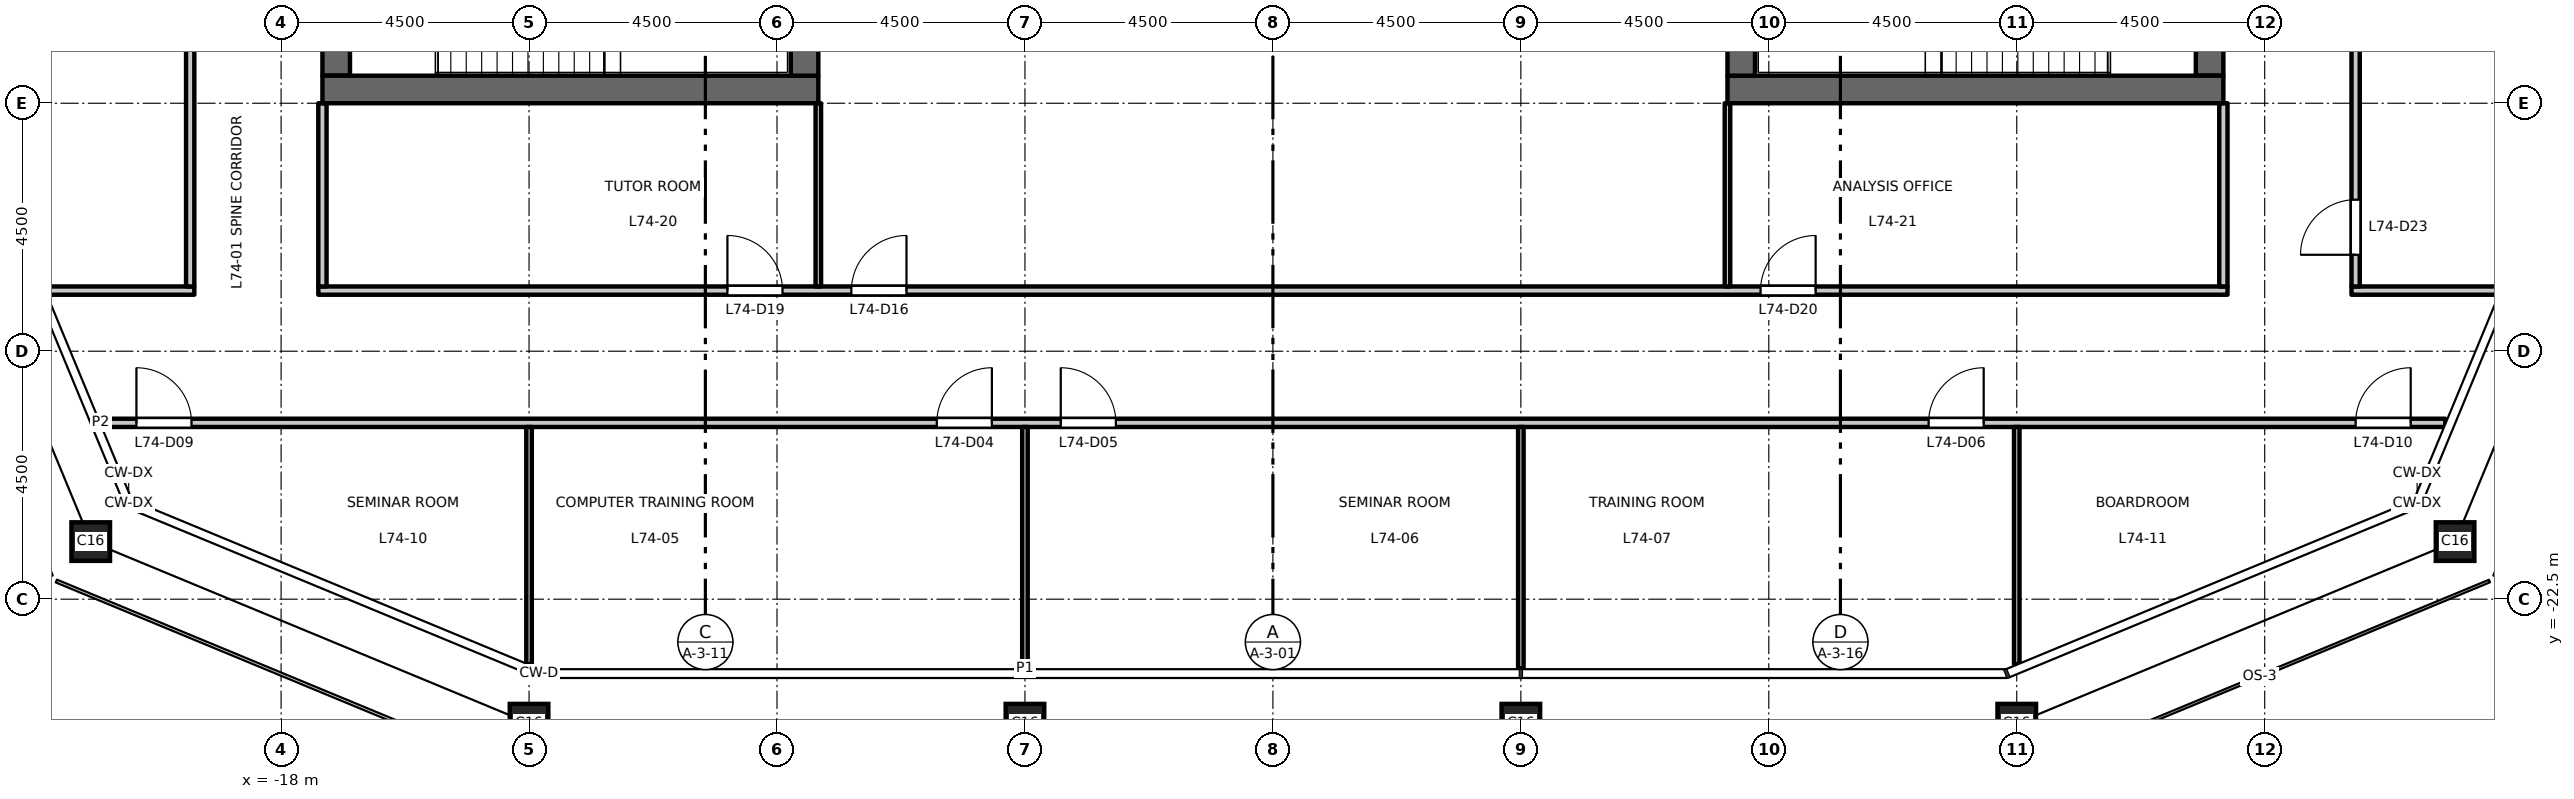
"""IFC4 building model, lengths in metres.
Left out: names, types, materials, properties, quantities, classifications, styles, units other than length and angle.
Written with IfcOpenShell. Run it as: python <this file> out.ifc"""

import sys

from ifc_helpers import new_model, si_unit, direction, frame, frame_2d, origin, origin_2d, place, context, subcontext, project, spatial, rectangle, hollow_rectangle, extrude, element, fill, save


model = new_model("IFC4")
c1 = context("Model", 3, precision=1e-05, world=origin(), true_north=direction((0.0, 1.0)))
c2 = subcontext(c1, "Body", "Model", "MODEL_VIEW")
j1 = project(units=[si_unit("LENGTHUNIT", "METRE"), si_unit("PLANEANGLEUNIT", "RADIAN")], contexts=[c1])
p1 = place(None, origin())
s1 = spatial("IfcSite", under=j1, at=p1, CompositionType="ELEMENT")
p2 = place(p1, origin())
s2 = spatial("IfcBuilding", under=s1, at=p2, CompositionType="ELEMENT")
p3 = place(p2, frame((0.0, 0.0, 343.7)))
s3 = spatial("IfcBuildingStorey", under=s2, at=p3, CompositionType="ELEMENT", Elevation=343.7)
for number, where, z_axis, x_axis in (
    (1, (-13.5, -24.75, 0.0), (0.0, 0.0, 1.0), (1.0, 0.0, 0.0)),
    (2, (-4.5, -24.75, 0.0), (0.0, 0.0, 1.0), (1.0, 0.0, 0.0)),
    (3, (4.5, -24.75, 0.0), (0.0, 0.0, 1.0), (1.0, 0.0, 0.0)),
    (4, (13.5, -24.75, 0.0), (0.0, 0.0, 1.0), (1.0, 0.0, 0.0)),
    (5, (21.455, -21.455, 0.0), (0.0, 0.0, 1.0), (1.0, 0.0, 0.0)),
    (6, (-21.455, -21.455, 0.0), (0.0, 0.0, 1.0), (1.0, 0.0, 0.0)),
):
    element("IfcColumn", number, at=place(p3, frame(where, z_axis=z_axis, x_axis=x_axis)), inside=s3, PredefinedType="COLUMN", context=c2, shape_type="SweptSolid", body=[
        extrude(hollow_rectangle(XDim=0.7, YDim=0.7, WallThickness=0.036, at=origin_2d()), origin(), (0.0, 0.0, 1.0), 4.5),
    ])
p4 = place(p3, frame((-17.0, -13.0, 0.0), z_axis=(0.0, 0.0, 1.0), x_axis=(0.0, 1.0, 0.0)))
e7 = element("IfcWall", 7, at=p4, inside=s3, PredefinedType="SHEAR", context=c2, shape_type="SweptSolid", body=[
    extrude(rectangle(XDim=26.0, YDim=0.5, at=frame_2d((13.0, 0.0))), origin(), (0.0, 0.0, 1.0), 4.3),
])
p5 = place(p4, frame((16.825, 0.0, 0.0)))
e8 = element("IfcOpeningElement", 8, at=p5, cuts=e7, PredefinedType="OPENING", context=c2, shape_type="SweptSolid", body=[
    extrude(rectangle(XDim=1.8, YDim=2.1, at=frame_2d((0.9, 1.05))), frame((0.0, 0.26, 0.0), z_axis=(0.0, -1.0, 0.0), x_axis=(1.0, 0.0, 0.0)), (0.0, 0.0, 1.0), 0.52),
])
p6 = place(p4, frame((7.375, 0.0, 0.0)))
e9 = element("IfcOpeningElement", 9, at=p6, cuts=e7, PredefinedType="OPENING", context=c2, shape_type="SweptSolid", body=[
    extrude(rectangle(XDim=1.8, YDim=2.1, at=frame_2d((0.9, 1.05))), frame((0.0, 0.26, 0.0), z_axis=(0.0, -1.0, 0.0), x_axis=(1.0, 0.0, 0.0)), (0.0, 0.0, 1.0), 0.52),
])
p7 = place(p3, frame((-8.25, -13.25, 0.0), z_axis=(0.0, 0.0, 1.0), x_axis=(-1.0, 0.0, 0.0)))
e10 = element("IfcWall", 10, at=p7, inside=s3, PredefinedType="SHEAR", context=c2, shape_type="SweptSolid", body=[
    extrude(rectangle(XDim=9.0, YDim=0.5, at=frame_2d((4.5, 0.0))), origin(), (0.0, 0.0, 1.0), 4.3),
])
p8 = place(p3, frame((-8.5, -13.0, 0.0), z_axis=(0.0, 0.0, 1.0), x_axis=(0.0, 1.0, 0.0)))
e11 = element("IfcWall", 11, at=p8, inside=s3, PredefinedType="SHEAR", context=c2, shape_type="SweptSolid", body=[
    extrude(rectangle(XDim=26.0, YDim=0.5, at=frame_2d((13.0, 0.0))), origin(), (0.0, 0.0, 1.0), 4.3),
])
p9 = place(p3, frame((17.0, -13.0, 0.0), z_axis=(0.0, 0.0, 1.0), x_axis=(0.0, 1.0, 0.0)))
e12 = element("IfcWall", 12, at=p9, inside=s3, PredefinedType="SHEAR", context=c2, shape_type="SweptSolid", body=[
    extrude(rectangle(XDim=26.0, YDim=0.5, at=frame_2d((13.0, 0.0))), origin(), (0.0, 0.0, 1.0), 4.3),
])
p10 = place(p9, frame((16.825, 0.0, 0.0)))
e13 = element("IfcOpeningElement", 13, at=p10, cuts=e12, PredefinedType="OPENING", context=c2, shape_type="SweptSolid", body=[
    extrude(rectangle(XDim=1.8, YDim=2.1, at=frame_2d((0.9, 1.05))), frame((0.0, 0.26, 0.0), z_axis=(0.0, -1.0, 0.0), x_axis=(1.0, 0.0, 0.0)), (0.0, 0.0, 1.0), 0.52),
])
p11 = place(p9, frame((7.375, 0.0, 0.0)))
e14 = element("IfcOpeningElement", 14, at=p11, cuts=e12, PredefinedType="OPENING", context=c2, shape_type="SweptSolid", body=[
    extrude(rectangle(XDim=1.8, YDim=2.1, at=frame_2d((0.9, 1.05))), frame((0.0, 0.26, 0.0), z_axis=(0.0, -1.0, 0.0), x_axis=(1.0, 0.0, 0.0)), (0.0, 0.0, 1.0), 0.52),
])
p12 = place(p3, frame((8.25, -13.25, 0.0), z_axis=(0.0, 0.0, 1.0), x_axis=(1.0, 0.0, 0.0)))
e15 = element("IfcWall", 15, at=p12, inside=s3, PredefinedType="SHEAR", context=c2, shape_type="SweptSolid", body=[
    extrude(rectangle(XDim=9.0, YDim=0.5, at=frame_2d((4.5, 0.0))), origin(), (0.0, 0.0, 1.0), 4.3),
])
p13 = place(p3, frame((8.5, -13.0, 0.0), z_axis=(0.0, 0.0, 1.0), x_axis=(0.0, 1.0, 0.0)))
e16 = element("IfcWall", 16, at=p13, inside=s3, PredefinedType="SHEAR", context=c2, shape_type="SweptSolid", body=[
    extrude(rectangle(XDim=26.0, YDim=0.5, at=frame_2d((13.0, 0.0))), origin(), (0.0, 0.0, 1.0), 4.3),
])
p14 = place(p3, frame((-21.276, -19.3, 0.0), z_axis=(0.0, 0.0, 1.0), x_axis=(1.0, 0.0, 0.0)))
e17 = element("IfcWall", 17, at=p14, inside=s3, PredefinedType="PARTITIONING", context=c2, shape_type="SweptSolid", body=[
    extrude(rectangle(XDim=42.552, YDim=0.15, at=frame_2d((21.276, 0.0))), origin(), (0.0, 0.0, 1.0), 4.3),
])
p15 = place(p14, frame((15.176, 0.0, 0.0)))
e18 = element("IfcOpeningElement", 18, at=p15, cuts=e17, PredefinedType="OPENING", context=c2, shape_type="SweptSolid", body=[
    extrude(rectangle(XDim=1.0, YDim=2.1, at=frame_2d((0.5, 1.05))), frame((0.0, 0.085, 0.0), z_axis=(0.0, -1.0, 0.0), x_axis=(1.0, 0.0, 0.0)), (0.0, 0.0, 1.0), 0.17),
])
p16 = place(p14, frame((17.426, 0.0, 0.0)))
e19 = element("IfcOpeningElement", 19, at=p16, cuts=e17, PredefinedType="OPENING", context=c2, shape_type="SweptSolid", body=[
    extrude(rectangle(XDim=1.0, YDim=2.1, at=frame_2d((0.5, 1.05))), frame((0.0, 0.085, 0.0), z_axis=(0.0, -1.0, 0.0), x_axis=(1.0, 0.0, 0.0)), (0.0, 0.0, 1.0), 0.17),
])
p17 = place(p14, frame((33.176, 0.0, 0.0)))
e20 = element("IfcOpeningElement", 20, at=p17, cuts=e17, PredefinedType="OPENING", context=c2, shape_type="SweptSolid", body=[
    extrude(rectangle(XDim=1.0, YDim=2.1, at=frame_2d((0.5, 1.05))), frame((0.0, 0.085, 0.0), z_axis=(0.0, -1.0, 0.0), x_axis=(1.0, 0.0, 0.0)), (0.0, 0.0, 1.0), 0.17),
])
p18 = place(p14, frame((0.65, 0.0, 0.0)))
e21 = element("IfcOpeningElement", 21, at=p18, cuts=e17, PredefinedType="OPENING", context=c2, shape_type="SweptSolid", body=[
    extrude(rectangle(XDim=1.0, YDim=2.1, at=frame_2d((0.5, 1.05))), frame((0.0, 0.085, 0.0), z_axis=(0.0, -1.0, 0.0), x_axis=(1.0, 0.0, 0.0)), (0.0, 0.0, 1.0), 0.17),
])
p19 = place(p14, frame((40.926, 0.0, 0.0)))
e22 = element("IfcOpeningElement", 22, at=p19, cuts=e17, PredefinedType="OPENING", context=c2, shape_type="SweptSolid", body=[
    extrude(rectangle(XDim=1.0, YDim=2.1, at=frame_2d((0.5, 1.05))), frame((0.0, 0.085, 0.0), z_axis=(0.0, -1.0, 0.0), x_axis=(1.0, 0.0, 0.0)), (0.0, 0.0, 1.0), 0.17),
])
p20 = place(p3, frame((-22.27, -16.9, 0.0), z_axis=(0.0, 0.0, 1.0), x_axis=(1.0, 0.0, 0.0)))
e23 = element("IfcWall", 23, at=p20, inside=s3, PredefinedType="PARTITIONING", context=c2, shape_type="SweptSolid", body=[
    extrude(rectangle(XDim=2.695, YDim=0.15, at=frame_2d((1.348, 0.0))), origin(), (0.0, 0.0, 1.0), 4.3),
])
p21 = place(p3, frame((-17.325, -16.9, 0.0), z_axis=(0.0, 0.0, 1.0), x_axis=(1.0, 0.0, 0.0)))
e24 = element("IfcWall", 24, at=p21, inside=s3, PredefinedType="PARTITIONING", context=c2, shape_type="SweptSolid", body=[
    extrude(rectangle(XDim=34.65, YDim=0.15, at=frame_2d((17.325, 0.0))), origin(), (0.0, 0.0, 1.0), 4.3),
])
p22 = place(p21, frame((9.675, 0.0, 0.0)))
e25 = element("IfcOpeningElement", 25, at=p22, cuts=e24, PredefinedType="OPENING", context=c2, shape_type="SweptSolid", body=[
    extrude(rectangle(XDim=1.0, YDim=2.1, at=frame_2d((0.5, 1.05))), frame((0.0, 0.085, 0.0), z_axis=(0.0, -1.0, 0.0), x_axis=(1.0, 0.0, 0.0)), (0.0, 0.0, 1.0), 0.17),
])
p23 = place(p21, frame((7.425, 0.0, 0.0)))
e26 = element("IfcOpeningElement", 26, at=p23, cuts=e24, PredefinedType="OPENING", context=c2, shape_type="SweptSolid", body=[
    extrude(rectangle(XDim=1.0, YDim=2.1, at=frame_2d((0.5, 1.05))), frame((0.0, 0.085, 0.0), z_axis=(0.0, -1.0, 0.0), x_axis=(1.0, 0.0, 0.0)), (0.0, 0.0, 1.0), 0.17),
])
p24 = place(p21, frame((26.175, 0.0, 0.0)))
e27 = element("IfcOpeningElement", 27, at=p24, cuts=e24, PredefinedType="OPENING", context=c2, shape_type="SweptSolid", body=[
    extrude(rectangle(XDim=1.0, YDim=2.1, at=frame_2d((0.5, 1.05))), frame((0.0, 0.085, 0.0), z_axis=(0.0, -1.0, 0.0), x_axis=(1.0, 0.0, 0.0)), (0.0, 0.0, 1.0), 0.17),
])
p25 = place(p3, frame((19.575, -16.9, 0.0), z_axis=(0.0, 0.0, 1.0), x_axis=(1.0, 0.0, 0.0)))
e28 = element("IfcWall", 28, at=p25, inside=s3, PredefinedType="PARTITIONING", context=c2, shape_type="SweptSolid", body=[
    extrude(rectangle(XDim=2.695, YDim=0.15, at=frame_2d((1.348, 0.0))), origin(), (0.0, 0.0, 1.0), 4.3),
])
p26 = place(p3, frame((-19.65, -16.825, 0.0), z_axis=(0.0, 0.0, 1.0), x_axis=(0.0, 1.0, 0.0)))
e29 = element("IfcWall", 29, at=p26, inside=s3, PredefinedType="PARTITIONING", context=c2, shape_type="SweptSolid", body=[
    extrude(rectangle(XDim=33.65, YDim=0.15, at=frame_2d((16.825, 0.0))), origin(), (0.0, 0.0, 1.0), 4.3),
])
p27 = place(p26, frame((32.075, 0.0, 0.0)))
e30 = element("IfcOpeningElement", 30, at=p27, cuts=e29, PredefinedType="OPENING", context=c2, shape_type="SweptSolid", body=[
    extrude(rectangle(XDim=1.0, YDim=2.1, at=frame_2d((0.5, 1.05))), frame((0.0, 0.085, 0.0), z_axis=(0.0, -1.0, 0.0), x_axis=(1.0, 0.0, 0.0)), (0.0, 0.0, 1.0), 0.17),
])
p28 = place(p3, frame((-17.25, -16.825, 0.0), z_axis=(0.0, 0.0, 1.0), x_axis=(0.0, 1.0, 0.0)))
e31 = element("IfcWall", 31, at=p28, inside=s3, PredefinedType="PARTITIONING", context=c2, shape_type="SweptSolid", body=[
    extrude(rectangle(XDim=3.325, YDim=0.15, at=frame_2d((1.663, 0.0))), origin(), (0.0, 0.0, 1.0), 4.3),
])
p29 = place(p3, frame((-13.5, -23.678, 0.0), z_axis=(0.0, 0.0, 1.0), x_axis=(0.0, 1.0, 0.0)))
e32 = element("IfcWall", 32, at=p29, inside=s3, PredefinedType="PARTITIONING", context=c2, shape_type="SweptSolid", body=[
    extrude(rectangle(XDim=4.303, YDim=0.1, at=frame_2d((2.151, 0.0))), origin(), (0.0, 0.0, 1.0), 3.7),
])
p30 = place(p3, frame((-8.25, -16.825, 0.0), z_axis=(0.0, 0.0, 1.0), x_axis=(0.0, 1.0, 0.0)))
e33 = element("IfcWall", 33, at=p30, inside=s3, PredefinedType="PARTITIONING", context=c2, shape_type="SweptSolid", body=[
    extrude(rectangle(XDim=3.325, YDim=0.1, at=frame_2d((1.663, 0.0))), origin(), (0.0, 0.0, 1.0), 4.3),
])
for number, where, z_axis, x_axis in (
    (34, (-4.5, -23.76, 0.0), (0.0, 0.0, 1.0), (0.0, 1.0, 0.0)),
    (35, (4.5, -23.76, 0.0), (0.0, 0.0, 1.0), (0.0, 1.0, 0.0)),
):
    element("IfcWall", number, at=place(p3, frame(where, z_axis=z_axis, x_axis=x_axis)), inside=s3, PredefinedType="PARTITIONING", context=c2, shape_type="SweptSolid", body=[
        extrude(rectangle(XDim=4.385, YDim=0.1, at=frame_2d((2.192, 0.0))), origin(), (0.0, 0.0, 1.0), 3.6),
    ])
p31 = place(p3, frame((8.25, -16.825, 0.0), z_axis=(0.0, 0.0, 1.0), x_axis=(0.0, 1.0, 0.0)))
e36 = element("IfcWall", 36, at=p31, inside=s3, PredefinedType="PARTITIONING", context=c2, shape_type="SweptSolid", body=[
    extrude(rectangle(XDim=3.325, YDim=0.1, at=frame_2d((1.663, 0.0))), origin(), (0.0, 0.0, 1.0), 4.3),
])
p32 = place(p3, frame((13.5, -23.678, 0.0), z_axis=(0.0, 0.0, 1.0), x_axis=(0.0, 1.0, 0.0)))
e37 = element("IfcWall", 37, at=p32, inside=s3, PredefinedType="PARTITIONING", context=c2, shape_type="SweptSolid", body=[
    extrude(rectangle(XDim=4.303, YDim=0.1, at=frame_2d((2.151, 0.0))), origin(), (0.0, 0.0, 1.0), 3.7),
])
p33 = place(p3, frame((17.25, -16.825, 0.0), z_axis=(0.0, 0.0, 1.0), x_axis=(0.0, 1.0, 0.0)))
e38 = element("IfcWall", 38, at=p33, inside=s3, PredefinedType="PARTITIONING", context=c2, shape_type="SweptSolid", body=[
    extrude(rectangle(XDim=3.325, YDim=0.15, at=frame_2d((1.663, 0.0))), origin(), (0.0, 0.0, 1.0), 4.3),
])
p34 = place(p3, frame((19.65, -16.825, 0.0), z_axis=(0.0, 0.0, 1.0), x_axis=(0.0, 1.0, 0.0)))
e39 = element("IfcWall", 39, at=p34, inside=s3, PredefinedType="PARTITIONING", context=c2, shape_type="SweptSolid", body=[
    extrude(rectangle(XDim=36.05, YDim=0.15, at=frame_2d((18.025, 0.0))), origin(), (0.0, 0.0, 1.0), 4.3),
])
p35 = place(p34, frame((0.575, 0.0, 0.0)))
e40 = element("IfcOpeningElement", 40, at=p35, cuts=e39, PredefinedType="OPENING", context=c2, shape_type="SweptSolid", body=[
    extrude(rectangle(XDim=1.0, YDim=2.1, at=frame_2d((0.5, 1.05))), frame((0.0, 0.085, 0.0), z_axis=(0.0, -1.0, 0.0), x_axis=(1.0, 0.0, 0.0)), (0.0, 0.0, 1.0), 0.17),
])
p36 = place(p15, origin())
e41 = element("IfcDoor", 41, at=p36, inside=s3, OperationType="SINGLE_SWING_RIGHT", PredefinedType="DOOR", context=c2, shape_type="SweptSolid", body=[
    extrude(rectangle(XDim=1.0, YDim=2.1, at=frame_2d((0.5, 1.05))), frame((0.0, 0.025, 0.0), z_axis=(0.0, -1.0, 0.0), x_axis=(1.0, 0.0, 0.0)), (0.0, 0.0, 1.0), 0.05),
])
fill(e18, e41)
p37 = place(p16, origin())
e42 = element("IfcDoor", 42, at=p37, inside=s3, OperationType="SINGLE_SWING_LEFT", PredefinedType="DOOR", context=c2, shape_type="SweptSolid", body=[
    extrude(rectangle(XDim=1.0, YDim=2.1, at=frame_2d((0.5, 1.05))), frame((0.0, 0.025, 0.0), z_axis=(0.0, -1.0, 0.0), x_axis=(1.0, 0.0, 0.0)), (0.0, 0.0, 1.0), 0.05),
])
fill(e19, e42)
p38 = place(p17, origin())
e43 = element("IfcDoor", 43, at=p38, inside=s3, OperationType="SINGLE_SWING_RIGHT", PredefinedType="DOOR", context=c2, shape_type="SweptSolid", body=[
    extrude(rectangle(XDim=1.0, YDim=2.1, at=frame_2d((0.5, 1.05))), frame((0.0, 0.025, 0.0), z_axis=(0.0, -1.0, 0.0), x_axis=(1.0, 0.0, 0.0)), (0.0, 0.0, 1.0), 0.05),
])
fill(e20, e43)
p39 = place(p18, origin())
e44 = element("IfcDoor", 44, at=p39, inside=s3, OperationType="SINGLE_SWING_LEFT", PredefinedType="DOOR", context=c2, shape_type="SweptSolid", body=[
    extrude(rectangle(XDim=1.0, YDim=2.1, at=frame_2d((0.5, 1.05))), frame((0.0, 0.025, 0.0), z_axis=(0.0, -1.0, 0.0), x_axis=(1.0, 0.0, 0.0)), (0.0, 0.0, 1.0), 0.05),
])
fill(e21, e44)
p40 = place(p19, origin())
e45 = element("IfcDoor", 45, at=p40, inside=s3, OperationType="SINGLE_SWING_RIGHT", PredefinedType="DOOR", context=c2, shape_type="SweptSolid", body=[
    extrude(rectangle(XDim=1.0, YDim=2.1, at=frame_2d((0.5, 1.05))), frame((0.0, 0.025, 0.0), z_axis=(0.0, -1.0, 0.0), x_axis=(1.0, 0.0, 0.0)), (0.0, 0.0, 1.0), 0.05),
])
fill(e22, e45)
p41 = place(p22, origin())
e46 = element("IfcDoor", 46, at=p41, inside=s3, OperationType="SINGLE_SWING_RIGHT", PredefinedType="DOOR", context=c2, shape_type="SweptSolid", body=[
    extrude(rectangle(XDim=1.0, YDim=2.1, at=frame_2d((0.5, 1.05))), frame((0.0, 0.025, 0.0), z_axis=(0.0, -1.0, 0.0), x_axis=(1.0, 0.0, 0.0)), (0.0, 0.0, 1.0), 0.05),
])
fill(e25, e46)
p42 = place(p23, origin())
e47 = element("IfcDoor", 47, at=p42, inside=s3, OperationType="SINGLE_SWING_LEFT", PredefinedType="DOOR", context=c2, shape_type="SweptSolid", body=[
    extrude(rectangle(XDim=1.0, YDim=2.1, at=frame_2d((0.5, 1.05))), frame((0.0, 0.025, 0.0), z_axis=(0.0, -1.0, 0.0), x_axis=(1.0, 0.0, 0.0)), (0.0, 0.0, 1.0), 0.05),
])
fill(e26, e47)
p43 = place(p24, origin())
e48 = element("IfcDoor", 48, at=p43, inside=s3, OperationType="SINGLE_SWING_RIGHT", PredefinedType="DOOR", context=c2, shape_type="SweptSolid", body=[
    extrude(rectangle(XDim=1.0, YDim=2.1, at=frame_2d((0.5, 1.05))), frame((0.0, 0.025, 0.0), z_axis=(0.0, -1.0, 0.0), x_axis=(1.0, 0.0, 0.0)), (0.0, 0.0, 1.0), 0.05),
])
fill(e27, e48)
p44 = place(p35, origin())
e49 = element("IfcDoor", 49, at=p44, inside=s3, OperationType="SINGLE_SWING_LEFT", PredefinedType="DOOR", context=c2, shape_type="SweptSolid", body=[
    extrude(rectangle(XDim=1.0, YDim=2.1, at=frame_2d((0.5, 1.05))), frame((0.0, 0.025, 0.0), z_axis=(0.0, -1.0, 0.0), x_axis=(1.0, 0.0, 0.0)), (0.0, 0.0, 1.0), 0.05),
])
fill(e40, e49)
save(model, sys.argv[1])
